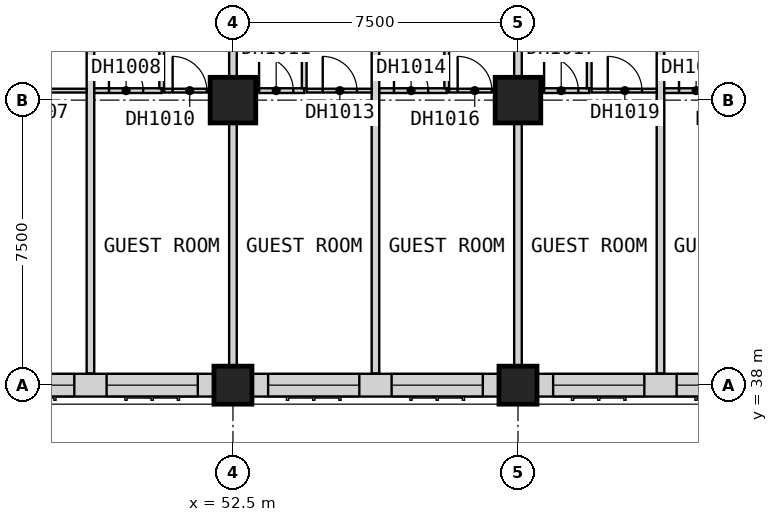
"""IFC4 building model, lengths in metres.
Left out: names, types, materials, properties, quantities, classifications, styles, units other than length and angle.
Written with IfcOpenShell. Run it as: python <this file> out.ifc"""

import sys

from ifc_helpers import new_model, si_unit, direction, frame, frame_2d, origin, origin_2d, place, context, subcontext, project, spatial, rectangle, extrude, element, fill, save


model = new_model("IFC4")
c1 = context("Model", 3, precision=1e-05, world=origin(), true_north=direction((0.0, 1.0)))
c2 = subcontext(c1, "Body", "Model", "MODEL_VIEW")
j1 = project(units=[si_unit("LENGTHUNIT", "METRE"), si_unit("PLANEANGLEUNIT", "RADIAN")], contexts=[c1])
p1 = place(None, origin())
s1 = spatial("IfcSite", under=j1, at=p1, CompositionType="ELEMENT")
p2 = place(p1, origin())
s2 = spatial("IfcBuilding", under=s1, at=p2, CompositionType="ELEMENT")
p3 = place(p2, frame((0.0, 0.0, 48.4)))
s3 = spatial("IfcBuildingStorey", under=s2, at=p3, CompositionType="ELEMENT", Elevation=48.4)
p4 = place(p3, frame((52.5, 38.0, 0.0), z_axis=(0.0, 0.0, 1.0), x_axis=(1.0, 0.0, 0.0)))
e1 = element("IfcColumn", 1, at=p4, inside=s3, PredefinedType="COLUMN", context=c2, shape_type="SweptSolid", body=[
    extrude(rectangle(XDim=1.0, YDim=1.0, at=origin_2d()), origin(), (0.0, 0.0, 1.0), 3.6),
])
p5 = place(p3, frame((52.5, 45.5, 0.0), z_axis=(0.0, 0.0, 1.0), x_axis=(1.0, 0.0, 0.0)))
e2 = element("IfcColumn", 2, at=p5, inside=s3, PredefinedType="COLUMN", context=c2, shape_type="SweptSolid", body=[
    extrude(rectangle(XDim=1.2, YDim=1.2, at=origin_2d()), origin(), (0.0, 0.0, 1.0), 3.6),
])
p6 = place(p3, frame((60.0, 38.0, 0.0), z_axis=(0.0, 0.0, 1.0), x_axis=(1.0, 0.0, 0.0)))
e3 = element("IfcColumn", 3, at=p6, inside=s3, PredefinedType="COLUMN", context=c2, shape_type="SweptSolid", body=[
    extrude(rectangle(XDim=1.0, YDim=1.0, at=origin_2d()), origin(), (0.0, 0.0, 1.0), 3.6),
])
p7 = place(p3, frame((60.0, 45.5, 0.0), z_axis=(0.0, 0.0, 1.0), x_axis=(1.0, 0.0, 0.0)))
e4 = element("IfcColumn", 4, at=p7, inside=s3, PredefinedType="COLUMN", context=c2, shape_type="SweptSolid", body=[
    extrude(rectangle(XDim=1.2, YDim=1.2, at=origin_2d()), origin(), (0.0, 0.0, 1.0), 3.6),
])
p8 = place(p3, frame((45.5, 38.0, 0.0), z_axis=(0.0, 0.0, 1.0), x_axis=(1.0, 0.0, 0.0)))
e5 = element("IfcWall", 5, at=p8, inside=s3, PredefinedType="SOLIDWALL", context=c2, shape_type="SweptSolid", body=[
    extrude(rectangle(XDim=6.5, YDim=0.6, at=frame_2d((3.25, 0.0))), origin(), (0.0, 0.0, 1.0), 2.85),
])
p9 = place(p8, frame((0.425, 0.0, 0.8)))
e6 = element("IfcOpeningElement", 6, at=p9, cuts=e5, PredefinedType="OPENING", context=c2, shape_type="SweptSolid", body=[
    extrude(rectangle(XDim=2.4, YDim=1.8, at=frame_2d((1.2, 0.9))), frame((0.0, 0.31, 0.0), z_axis=(0.0, -1.0, 0.0), x_axis=(1.0, 0.0, 0.0)), (0.0, 0.0, 1.0), 0.62),
])
p10 = place(p8, frame((3.675, 0.0, 0.8)))
e7 = element("IfcOpeningElement", 7, at=p10, cuts=e5, PredefinedType="OPENING", context=c2, shape_type="SweptSolid", body=[
    extrude(rectangle(XDim=2.4, YDim=1.8, at=frame_2d((1.2, 0.9))), frame((0.0, 0.31, 0.0), z_axis=(0.0, -1.0, 0.0), x_axis=(1.0, 0.0, 0.0)), (0.0, 0.0, 1.0), 0.62),
])
p11 = place(p3, frame((53.0, 38.0, 0.0), z_axis=(0.0, 0.0, 1.0), x_axis=(1.0, 0.0, 0.0)))
e8 = element("IfcWall", 8, at=p11, inside=s3, PredefinedType="SOLIDWALL", context=c2, shape_type="SweptSolid", body=[
    extrude(rectangle(XDim=6.5, YDim=0.6, at=frame_2d((3.25, 0.0))), origin(), (0.0, 0.0, 1.0), 2.85),
])
p12 = place(p11, frame((0.425, 0.0, 0.8)))
e9 = element("IfcOpeningElement", 9, at=p12, cuts=e8, PredefinedType="OPENING", context=c2, shape_type="SweptSolid", body=[
    extrude(rectangle(XDim=2.4, YDim=1.8, at=frame_2d((1.2, 0.9))), frame((0.0, 0.31, 0.0), z_axis=(0.0, -1.0, 0.0), x_axis=(1.0, 0.0, 0.0)), (0.0, 0.0, 1.0), 0.62),
])
p13 = place(p11, frame((3.675, 0.0, 0.8)))
e10 = element("IfcOpeningElement", 10, at=p13, cuts=e8, PredefinedType="OPENING", context=c2, shape_type="SweptSolid", body=[
    extrude(rectangle(XDim=2.4, YDim=1.8, at=frame_2d((1.2, 0.9))), frame((0.0, 0.31, 0.0), z_axis=(0.0, -1.0, 0.0), x_axis=(1.0, 0.0, 0.0)), (0.0, 0.0, 1.0), 0.62),
])
p14 = place(p3, frame((60.5, 38.0, 0.0), z_axis=(0.0, 0.0, 1.0), x_axis=(1.0, 0.0, 0.0)))
e11 = element("IfcWall", 11, at=p14, inside=s3, PredefinedType="SOLIDWALL", context=c2, shape_type="SweptSolid", body=[
    extrude(rectangle(XDim=6.5, YDim=0.6, at=frame_2d((3.25, 0.0))), origin(), (0.0, 0.0, 1.0), 2.85),
])
p15 = place(p14, frame((0.425, 0.0, 0.8)))
e12 = element("IfcOpeningElement", 12, at=p15, cuts=e11, PredefinedType="OPENING", context=c2, shape_type="SweptSolid", body=[
    extrude(rectangle(XDim=2.4, YDim=1.8, at=frame_2d((1.2, 0.9))), frame((0.0, 0.31, 0.0), z_axis=(0.0, -1.0, 0.0), x_axis=(1.0, 0.0, 0.0)), (0.0, 0.0, 1.0), 0.62),
])
p16 = place(p14, frame((3.675, 0.0, 0.8)))
e13 = element("IfcOpeningElement", 13, at=p16, cuts=e11, PredefinedType="OPENING", context=c2, shape_type="SweptSolid", body=[
    extrude(rectangle(XDim=2.4, YDim=1.8, at=frame_2d((1.2, 0.9))), frame((0.0, 0.31, 0.0), z_axis=(0.0, -1.0, 0.0), x_axis=(1.0, 0.0, 0.0)), (0.0, 0.0, 1.0), 0.62),
])
p17 = place(p3, frame((48.75, 38.31, 0.0), z_axis=(0.0, 0.0, 1.0), x_axis=(0.0, 1.0, 0.0)))
e14 = element("IfcWall", 14, at=p17, inside=s3, PredefinedType="PARTITIONING", context=c2, shape_type="SweptSolid", body=[
    extrude(rectangle(XDim=11.715, YDim=0.2, at=frame_2d((5.857, 0.0))), origin(), (0.0, 0.0, 1.0), 3.35),
])
p18 = place(p3, frame((52.5, 37.5, 0.0), z_axis=(0.0, 0.0, 1.0), x_axis=(0.0, 1.0, 0.0)))
e15 = element("IfcWall", 15, at=p18, inside=s3, PredefinedType="PARTITIONING", context=c2, shape_type="SweptSolid", body=[
    extrude(rectangle(XDim=12.525, YDim=0.2, at=frame_2d((6.262, 0.0))), origin(), (0.0, 0.0, 1.0), 3.35),
])
p19 = place(p3, frame((56.25, 38.31, 0.0), z_axis=(0.0, 0.0, 1.0), x_axis=(0.0, 1.0, 0.0)))
e16 = element("IfcWall", 16, at=p19, inside=s3, PredefinedType="PARTITIONING", context=c2, shape_type="SweptSolid", body=[
    extrude(rectangle(XDim=11.715, YDim=0.2, at=frame_2d((5.857, 0.0))), origin(), (0.0, 0.0, 1.0), 3.35),
])
p20 = place(p3, frame((60.0, 37.5, 0.0), z_axis=(0.0, 0.0, 1.0), x_axis=(0.0, 1.0, 0.0)))
e17 = element("IfcWall", 17, at=p20, inside=s3, PredefinedType="PARTITIONING", context=c2, shape_type="SweptSolid", body=[
    extrude(rectangle(XDim=12.525, YDim=0.2, at=frame_2d((6.262, 0.0))), origin(), (0.0, 0.0, 1.0), 3.35),
])
p21 = place(p3, frame((63.75, 38.31, 0.0), z_axis=(0.0, 0.0, 1.0), x_axis=(0.0, 1.0, 0.0)))
e18 = element("IfcWall", 18, at=p21, inside=s3, PredefinedType="PARTITIONING", context=c2, shape_type="SweptSolid", body=[
    extrude(rectangle(XDim=11.715, YDim=0.2, at=frame_2d((5.857, 0.0))), origin(), (0.0, 0.0, 1.0), 3.35),
])
p22 = place(p3, frame((45.812, 45.75, 0.0), z_axis=(0.0, 0.0, 1.0), x_axis=(1.0, 0.0, 0.0)))
e19 = element("IfcWall", 19, at=p22, inside=s3, PredefinedType="PARTITIONING", context=c2, shape_type="SweptSolid", body=[
    extrude(rectangle(XDim=2.837, YDim=0.1, at=frame_2d((1.419, 0.0))), origin(), (0.0, 0.0, 1.0), 3.35),
])
p23 = place(p22, frame((0.988, 0.0, 0.0)))
e20 = element("IfcOpeningElement", 20, at=p23, cuts=e19, PredefinedType="OPENING", context=c2, shape_type="SweptSolid", body=[
    extrude(rectangle(XDim=0.9, YDim=2.1, at=frame_2d((0.45, 1.05))), frame((0.0, 0.06, 0.0), z_axis=(0.0, -1.0, 0.0), x_axis=(1.0, 0.0, 0.0)), (0.0, 0.0, 1.0), 0.12),
])
p24 = place(p3, frame((50.688, 45.75, 0.0), z_axis=(0.0, 0.0, 1.0), x_axis=(1.0, 0.0, 0.0)))
e21 = element("IfcWall", 21, at=p24, inside=s3, PredefinedType="PARTITIONING", context=c2, shape_type="SweptSolid", body=[
    extrude(rectangle(XDim=1.712, YDim=0.1, at=frame_2d((0.856, 0.0))), origin(), (0.0, 0.0, 1.0), 3.35),
])
p25 = place(p24, frame((0.225, 0.0, 0.0)))
e22 = element("IfcOpeningElement", 22, at=p25, cuts=e21, PredefinedType="OPENING", context=c2, shape_type="SweptSolid", body=[
    extrude(rectangle(XDim=0.9, YDim=2.1, at=frame_2d((0.45, 1.05))), frame((0.0, 0.06, 0.0), z_axis=(0.0, -1.0, 0.0), x_axis=(1.0, 0.0, 0.0)), (0.0, 0.0, 1.0), 0.12),
])
p26 = place(p3, frame((54.438, 45.75, 0.0), z_axis=(0.0, 0.0, 1.0), x_axis=(1.0, 0.0, 0.0)))
e23 = element("IfcWall", 23, at=p26, inside=s3, PredefinedType="PARTITIONING", context=c2, shape_type="SweptSolid", body=[
    extrude(rectangle(XDim=1.712, YDim=0.1, at=frame_2d((0.856, 0.0))), origin(), (0.0, 0.0, 1.0), 3.35),
])
p27 = place(p26, frame((0.425, 0.0, 0.0)))
e24 = element("IfcOpeningElement", 24, at=p27, cuts=e23, PredefinedType="OPENING", context=c2, shape_type="SweptSolid", body=[
    extrude(rectangle(XDim=0.9, YDim=2.1, at=frame_2d((0.45, 1.05))), frame((0.0, 0.06, 0.0), z_axis=(0.0, -1.0, 0.0), x_axis=(1.0, 0.0, 0.0)), (0.0, 0.0, 1.0), 0.12),
])
p28 = place(p3, frame((58.188, 45.75, 0.0), z_axis=(0.0, 0.0, 1.0), x_axis=(1.0, 0.0, 0.0)))
e25 = element("IfcWall", 25, at=p28, inside=s3, PredefinedType="PARTITIONING", context=c2, shape_type="SweptSolid", body=[
    extrude(rectangle(XDim=1.712, YDim=0.1, at=frame_2d((0.856, 0.0))), origin(), (0.0, 0.0, 1.0), 3.35),
])
p29 = place(p28, frame((0.225, 0.0, 0.0)))
e26 = element("IfcOpeningElement", 26, at=p29, cuts=e25, PredefinedType="OPENING", context=c2, shape_type="SweptSolid", body=[
    extrude(rectangle(XDim=0.9, YDim=2.1, at=frame_2d((0.45, 1.05))), frame((0.0, 0.06, 0.0), z_axis=(0.0, -1.0, 0.0), x_axis=(1.0, 0.0, 0.0)), (0.0, 0.0, 1.0), 0.12),
])
p30 = place(p3, frame((61.938, 45.75, 0.0), z_axis=(0.0, 0.0, 1.0), x_axis=(1.0, 0.0, 0.0)))
e27 = element("IfcWall", 27, at=p30, inside=s3, PredefinedType="PARTITIONING", context=c2, shape_type="SweptSolid", body=[
    extrude(rectangle(XDim=1.712, YDim=0.1, at=frame_2d((0.856, 0.0))), origin(), (0.0, 0.0, 1.0), 3.35),
])
p31 = place(p30, frame((0.425, 0.0, 0.0)))
e28 = element("IfcOpeningElement", 28, at=p31, cuts=e27, PredefinedType="OPENING", context=c2, shape_type="SweptSolid", body=[
    extrude(rectangle(XDim=0.9, YDim=2.1, at=frame_2d((0.45, 1.05))), frame((0.0, 0.06, 0.0), z_axis=(0.0, -1.0, 0.0), x_axis=(1.0, 0.0, 0.0)), (0.0, 0.0, 1.0), 0.12),
])
p32 = place(p3, frame((48.85, 45.75, 0.0), z_axis=(0.0, 0.0, 1.0), x_axis=(1.0, 0.0, 0.0)))
e29 = element("IfcWall", 29, at=p32, inside=s3, PredefinedType="PARTITIONING", context=c2, shape_type="SweptSolid", body=[
    extrude(rectangle(XDim=1.775, YDim=0.125, at=frame_2d((0.887, 0.0))), origin(), (0.0, 0.0, 1.0), 3.35),
])
p33 = place(p32, frame((0.387, 0.0, 0.0)))
e30 = element("IfcOpeningElement", 30, at=p33, cuts=e29, PredefinedType="OPENING", context=c2, shape_type="SweptSolid", body=[
    extrude(rectangle(XDim=0.9, YDim=2.1, at=frame_2d((0.45, 1.05))), frame((0.0, 0.073, 0.0), z_axis=(0.0, -1.0, 0.0), x_axis=(1.0, 0.0, 0.0)), (0.0, 0.0, 1.0), 0.145),
])
p34 = place(p3, frame((52.6, 45.75, 0.0), z_axis=(0.0, 0.0, 1.0), x_axis=(1.0, 0.0, 0.0)))
e31 = element("IfcWall", 31, at=p34, inside=s3, PredefinedType="PARTITIONING", context=c2, shape_type="SweptSolid", body=[
    extrude(rectangle(XDim=1.775, YDim=0.125, at=frame_2d((0.887, 0.0))), origin(), (0.0, 0.0, 1.0), 3.35),
])
p35 = place(p34, frame((0.587, 0.0, 0.0)))
e32 = element("IfcOpeningElement", 32, at=p35, cuts=e31, PredefinedType="OPENING", context=c2, shape_type="SweptSolid", body=[
    extrude(rectangle(XDim=0.9, YDim=2.1, at=frame_2d((0.45, 1.05))), frame((0.0, 0.073, 0.0), z_axis=(0.0, -1.0, 0.0), x_axis=(1.0, 0.0, 0.0)), (0.0, 0.0, 1.0), 0.145),
])
p36 = place(p3, frame((56.35, 45.75, 0.0), z_axis=(0.0, 0.0, 1.0), x_axis=(1.0, 0.0, 0.0)))
e33 = element("IfcWall", 33, at=p36, inside=s3, PredefinedType="PARTITIONING", context=c2, shape_type="SweptSolid", body=[
    extrude(rectangle(XDim=1.775, YDim=0.125, at=frame_2d((0.887, 0.0))), origin(), (0.0, 0.0, 1.0), 3.35),
])
p37 = place(p36, frame((0.387, 0.0, 0.0)))
e34 = element("IfcOpeningElement", 34, at=p37, cuts=e33, PredefinedType="OPENING", context=c2, shape_type="SweptSolid", body=[
    extrude(rectangle(XDim=0.9, YDim=2.1, at=frame_2d((0.45, 1.05))), frame((0.0, 0.073, 0.0), z_axis=(0.0, -1.0, 0.0), x_axis=(1.0, 0.0, 0.0)), (0.0, 0.0, 1.0), 0.145),
])
p38 = place(p3, frame((60.1, 45.75, 0.0), z_axis=(0.0, 0.0, 1.0), x_axis=(1.0, 0.0, 0.0)))
e35 = element("IfcWall", 35, at=p38, inside=s3, PredefinedType="PARTITIONING", context=c2, shape_type="SweptSolid", body=[
    extrude(rectangle(XDim=1.775, YDim=0.125, at=frame_2d((0.887, 0.0))), origin(), (0.0, 0.0, 1.0), 3.35),
])
p39 = place(p38, frame((0.587, 0.0, 0.0)))
e36 = element("IfcOpeningElement", 36, at=p39, cuts=e35, PredefinedType="OPENING", context=c2, shape_type="SweptSolid", body=[
    extrude(rectangle(XDim=0.9, YDim=2.1, at=frame_2d((0.45, 1.05))), frame((0.0, 0.073, 0.0), z_axis=(0.0, -1.0, 0.0), x_axis=(1.0, 0.0, 0.0)), (0.0, 0.0, 1.0), 0.145),
])
p40 = place(p3, frame((63.85, 45.75, 0.0), z_axis=(0.0, 0.0, 1.0), x_axis=(1.0, 0.0, 0.0)))
e37 = element("IfcWall", 37, at=p40, inside=s3, PredefinedType="PARTITIONING", context=c2, shape_type="SweptSolid", body=[
    extrude(rectangle(XDim=1.775, YDim=0.125, at=frame_2d((0.887, 0.0))), origin(), (0.0, 0.0, 1.0), 3.35),
])
p41 = place(p40, frame((0.387, 0.0, 0.0)))
e38 = element("IfcOpeningElement", 38, at=p41, cuts=e37, PredefinedType="OPENING", context=c2, shape_type="SweptSolid", body=[
    extrude(rectangle(XDim=0.9, YDim=2.1, at=frame_2d((0.45, 1.05))), frame((0.0, 0.073, 0.0), z_axis=(0.0, -1.0, 0.0), x_axis=(1.0, 0.0, 0.0)), (0.0, 0.0, 1.0), 0.145),
])
for number, where, z_axis, x_axis in (
    (39, (50.625, 45.812, 0.0), (0.0, 0.0, 1.0), (0.0, 1.0, 0.0)),
    (40, (54.375, 45.812, 0.0), (0.0, 0.0, 1.0), (0.0, 1.0, 0.0)),
    (41, (58.125, 45.812, 0.0), (0.0, 0.0, 1.0), (0.0, 1.0, 0.0)),
    (42, (61.875, 45.812, 0.0), (0.0, 0.0, 1.0), (0.0, 1.0, 0.0)),
):
    element("IfcWall", number, at=place(p3, frame(where, z_axis=z_axis, x_axis=x_axis)), inside=s3, PredefinedType="PARTITIONING", context=c2, shape_type="SweptSolid", body=[
        extrude(rectangle(XDim=4.212, YDim=0.125, at=frame_2d((2.106, 0.0))), origin(), (0.0, 0.0, 1.0), 3.35),
    ])
p42 = place(p9, origin())
e43 = element("IfcWindow", 43, at=p42, inside=s3, PartitioningType="SINGLE_PANEL", PredefinedType="WINDOW", context=c2, shape_type="SweptSolid", body=[
    extrude(rectangle(XDim=2.4, YDim=1.8, at=frame_2d((1.2, 0.9))), frame((0.0, -0.07, 0.0), z_axis=(0.0, -1.0, 0.0), x_axis=(1.0, 0.0, 0.0)), (0.0, 0.0, 1.0), 0.06),
])
fill(e6, e43)
p43 = place(p10, origin())
e44 = element("IfcWindow", 44, at=p43, inside=s3, PartitioningType="SINGLE_PANEL", PredefinedType="WINDOW", context=c2, shape_type="SweptSolid", body=[
    extrude(rectangle(XDim=2.4, YDim=1.8, at=frame_2d((1.2, 0.9))), frame((0.0, -0.07, 0.0), z_axis=(0.0, -1.0, 0.0), x_axis=(1.0, 0.0, 0.0)), (0.0, 0.0, 1.0), 0.06),
])
fill(e7, e44)
p44 = place(p12, origin())
e45 = element("IfcWindow", 45, at=p44, inside=s3, PartitioningType="SINGLE_PANEL", PredefinedType="WINDOW", context=c2, shape_type="SweptSolid", body=[
    extrude(rectangle(XDim=2.4, YDim=1.8, at=frame_2d((1.2, 0.9))), frame((0.0, -0.07, 0.0), z_axis=(0.0, -1.0, 0.0), x_axis=(1.0, 0.0, 0.0)), (0.0, 0.0, 1.0), 0.06),
])
fill(e9, e45)
p45 = place(p13, origin())
e46 = element("IfcWindow", 46, at=p45, inside=s3, PartitioningType="SINGLE_PANEL", PredefinedType="WINDOW", context=c2, shape_type="SweptSolid", body=[
    extrude(rectangle(XDim=2.4, YDim=1.8, at=frame_2d((1.2, 0.9))), frame((0.0, -0.07, 0.0), z_axis=(0.0, -1.0, 0.0), x_axis=(1.0, 0.0, 0.0)), (0.0, 0.0, 1.0), 0.06),
])
fill(e10, e46)
p46 = place(p15, origin())
e47 = element("IfcWindow", 47, at=p46, inside=s3, PartitioningType="SINGLE_PANEL", PredefinedType="WINDOW", context=c2, shape_type="SweptSolid", body=[
    extrude(rectangle(XDim=2.4, YDim=1.8, at=frame_2d((1.2, 0.9))), frame((0.0, -0.07, 0.0), z_axis=(0.0, -1.0, 0.0), x_axis=(1.0, 0.0, 0.0)), (0.0, 0.0, 1.0), 0.06),
])
fill(e12, e47)
p47 = place(p16, origin())
e48 = element("IfcWindow", 48, at=p47, inside=s3, PartitioningType="SINGLE_PANEL", PredefinedType="WINDOW", context=c2, shape_type="SweptSolid", body=[
    extrude(rectangle(XDim=2.4, YDim=1.8, at=frame_2d((1.2, 0.9))), frame((0.0, -0.07, 0.0), z_axis=(0.0, -1.0, 0.0), x_axis=(1.0, 0.0, 0.0)), (0.0, 0.0, 1.0), 0.06),
])
fill(e13, e48)
p48 = place(p33, origin())
e49 = element("IfcDoor", 49, at=p48, inside=s3, OperationType="SINGLE_SWING_LEFT", PredefinedType="DOOR", context=c2, shape_type="SweptSolid", body=[
    extrude(rectangle(XDim=0.9, YDim=2.1, at=frame_2d((0.45, 1.05))), frame((0.0, 0.025, 0.0), z_axis=(0.0, -1.0, 0.0), x_axis=(1.0, 0.0, 0.0)), (0.0, 0.0, 1.0), 0.05),
])
fill(e30, e49)
p49 = place(p25, origin())
e50 = element("IfcDoor", 50, at=p49, inside=s3, OperationType="SINGLE_SWING_LEFT", PredefinedType="DOOR", context=c2, shape_type="SweptSolid", body=[
    extrude(rectangle(XDim=0.9, YDim=2.1, at=frame_2d((0.45, 1.05))), frame((0.0, 0.025, 0.0), z_axis=(0.0, -1.0, 0.0), x_axis=(1.0, 0.0, 0.0)), (0.0, 0.0, 1.0), 0.05),
])
fill(e22, e50)
p50 = place(p35, origin())
e51 = element("IfcDoor", 51, at=p50, inside=s3, OperationType="SINGLE_SWING_RIGHT", PredefinedType="DOOR", context=c2, shape_type="SweptSolid", body=[
    extrude(rectangle(XDim=0.9, YDim=2.1, at=frame_2d((0.45, 1.05))), frame((0.0, 0.025, 0.0), z_axis=(0.0, -1.0, 0.0), x_axis=(1.0, 0.0, 0.0)), (0.0, 0.0, 1.0), 0.05),
])
fill(e32, e51)
p51 = place(p27, origin())
e52 = element("IfcDoor", 52, at=p51, inside=s3, OperationType="SINGLE_SWING_LEFT", PredefinedType="DOOR", context=c2, shape_type="SweptSolid", body=[
    extrude(rectangle(XDim=0.9, YDim=2.1, at=frame_2d((0.45, 1.05))), frame((0.0, 0.025, 0.0), z_axis=(0.0, -1.0, 0.0), x_axis=(1.0, 0.0, 0.0)), (0.0, 0.0, 1.0), 0.05),
])
fill(e24, e52)
p52 = place(p37, origin())
e53 = element("IfcDoor", 53, at=p52, inside=s3, OperationType="SINGLE_SWING_LEFT", PredefinedType="DOOR", context=c2, shape_type="SweptSolid", body=[
    extrude(rectangle(XDim=0.9, YDim=2.1, at=frame_2d((0.45, 1.05))), frame((0.0, 0.025, 0.0), z_axis=(0.0, -1.0, 0.0), x_axis=(1.0, 0.0, 0.0)), (0.0, 0.0, 1.0), 0.05),
])
fill(e34, e53)
p53 = place(p29, origin())
e54 = element("IfcDoor", 54, at=p53, inside=s3, OperationType="SINGLE_SWING_LEFT", PredefinedType="DOOR", context=c2, shape_type="SweptSolid", body=[
    extrude(rectangle(XDim=0.9, YDim=2.1, at=frame_2d((0.45, 1.05))), frame((0.0, 0.025, 0.0), z_axis=(0.0, -1.0, 0.0), x_axis=(1.0, 0.0, 0.0)), (0.0, 0.0, 1.0), 0.05),
])
fill(e26, e54)
p54 = place(p39, origin())
e55 = element("IfcDoor", 55, at=p54, inside=s3, OperationType="SINGLE_SWING_RIGHT", PredefinedType="DOOR", context=c2, shape_type="SweptSolid", body=[
    extrude(rectangle(XDim=0.9, YDim=2.1, at=frame_2d((0.45, 1.05))), frame((0.0, 0.025, 0.0), z_axis=(0.0, -1.0, 0.0), x_axis=(1.0, 0.0, 0.0)), (0.0, 0.0, 1.0), 0.05),
])
fill(e36, e55)
p55 = place(p31, origin())
e56 = element("IfcDoor", 56, at=p55, inside=s3, OperationType="SINGLE_SWING_LEFT", PredefinedType="DOOR", context=c2, shape_type="SweptSolid", body=[
    extrude(rectangle(XDim=0.9, YDim=2.1, at=frame_2d((0.45, 1.05))), frame((0.0, 0.025, 0.0), z_axis=(0.0, -1.0, 0.0), x_axis=(1.0, 0.0, 0.0)), (0.0, 0.0, 1.0), 0.05),
])
fill(e28, e56)
p56 = place(p41, origin())
e57 = element("IfcDoor", 57, at=p56, inside=s3, OperationType="SINGLE_SWING_LEFT", PredefinedType="DOOR", context=c2, shape_type="SweptSolid", body=[
    extrude(rectangle(XDim=0.9, YDim=2.1, at=frame_2d((0.45, 1.05))), frame((0.0, 0.025, 0.0), z_axis=(0.0, -1.0, 0.0), x_axis=(1.0, 0.0, 0.0)), (0.0, 0.0, 1.0), 0.05),
])
fill(e38, e57)
save(model, sys.argv[1])
